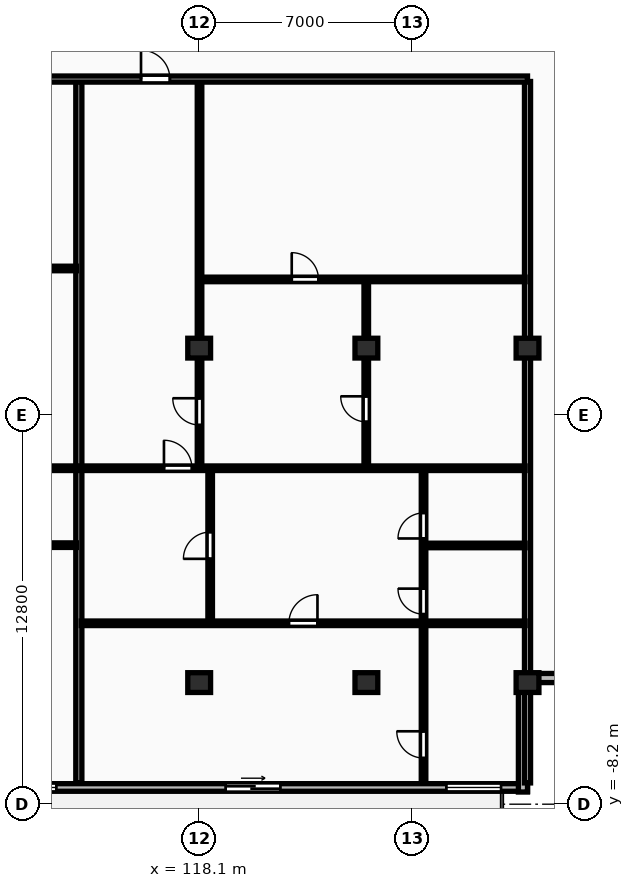
"""IFC4 building model, lengths in metres.
Left out: names, types, materials, properties, quantities, classifications, styles, units other than length and angle.
Written with IfcOpenShell. Run it as: python <this file> out.ifc"""

import sys

from ifc_helpers import new_model, si_unit, direction, frame, frame_2d, origin, origin_2d, place, context, subcontext, project, spatial, rectangle, extrude, element, fill, save


model = new_model("IFC4")
c1 = context("Model", 3, precision=1e-05, world=origin(), true_north=direction((0.0, 1.0)))
c2 = subcontext(c1, "Body", "Model", "MODEL_VIEW")
j1 = project(units=[si_unit("LENGTHUNIT", "METRE"), si_unit("PLANEANGLEUNIT", "RADIAN")], contexts=[c1])
p1 = place(None, origin())
s1 = spatial("IfcSite", under=j1, at=p1, CompositionType="ELEMENT")
p2 = place(p1, origin())
s2 = spatial("IfcBuilding", under=s1, at=p2, CompositionType="ELEMENT")
p3 = place(p2, frame((0.0, 0.0, 201.1)))
s3 = spatial("IfcBuildingStorey", under=s2, at=p3, CompositionType="ELEMENT", Elevation=201.1)
for number, where, z_axis, x_axis in (
    (1, (118.1, -4.2, 0.0), (0.0, 0.0, 1.0), (1.0, 0.0, 0.0)),
    (2, (118.1, 6.8, 0.0), (0.0, 0.0, 1.0), (1.0, 0.0, 0.0)),
    (3, (123.6, -4.2, 0.0), (0.0, 0.0, 1.0), (1.0, 0.0, 0.0)),
    (4, (123.6, 6.8, 0.0), (0.0, 0.0, 1.0), (1.0, 0.0, 0.0)),
    (5, (128.9, -4.2, 0.0), (0.0, 0.0, 1.0), (1.0, 0.0, 0.0)),
    (6, (128.9, 6.8, 0.0), (0.0, 0.0, 1.0), (1.0, 0.0, 0.0)),
):
    element("IfcColumn", number, at=place(p3, frame(where, z_axis=z_axis, x_axis=x_axis)), inside=s3, PredefinedType="COLUMN", context=c2, shape_type="SweptSolid", body=[
        extrude(rectangle(XDim=0.75, YDim=0.65, at=origin_2d()), origin(), (0.0, 0.0, 1.0), 3.25),
    ])
p4 = place(p3, frame((74.5, -7.65, 0.0), z_axis=(0.0, 0.0, 1.0), x_axis=(1.0, 0.0, 0.0)))
e7 = element("IfcWall", 7, at=p4, inside=s3, PredefinedType="STANDARD", context=c2, shape_type="SweptSolid", body=[
    extrude(rectangle(XDim=54.4, YDim=0.25, at=frame_2d((27.2, 0.0))), origin(), (0.0, 0.0, 1.0), 2.97),
])
p5 = place(p4, frame((3.604, 0.0, 0.0)))
e8 = element("IfcOpeningElement", 8, at=p5, cuts=e7, PredefinedType="OPENING", context=c2, shape_type="SweptSolid", body=[
    extrude(rectangle(XDim=1.8, YDim=2.2, at=frame_2d((0.9, 1.1))), frame((0.0, 0.135, 0.0), z_axis=(0.0, -1.0, 0.0), x_axis=(1.0, 0.0, 0.0)), (0.0, 0.0, 1.0), 0.27),
])
p6 = place(p4, frame((13.492, 0.0, 0.85)))
e9 = element("IfcOpeningElement", 9, at=p6, cuts=e7, PredefinedType="OPENING", context=c2, shape_type="SweptSolid", body=[
    extrude(rectangle(XDim=2.4, YDim=1.9, at=frame_2d((1.2, 0.95))), frame((0.0, 0.135, 0.0), z_axis=(0.0, -1.0, 0.0), x_axis=(1.0, 0.0, 0.0)), (0.0, 0.0, 1.0), 0.27),
])
p7 = place(p4, frame((28.655, 0.0, 0.85)))
e10 = element("IfcOpeningElement", 10, at=p7, cuts=e7, PredefinedType="OPENING", context=c2, shape_type="SweptSolid", body=[
    extrude(rectangle(XDim=2.4, YDim=1.9, at=frame_2d((1.2, 0.95))), frame((0.0, 0.135, 0.0), z_axis=(0.0, -1.0, 0.0), x_axis=(1.0, 0.0, 0.0)), (0.0, 0.0, 1.0), 0.27),
])
p8 = place(p4, frame((33.155, 0.0, 0.85)))
e11 = element("IfcOpeningElement", 11, at=p8, cuts=e7, PredefinedType="OPENING", context=c2, shape_type="SweptSolid", body=[
    extrude(rectangle(XDim=2.4, YDim=1.9, at=frame_2d((1.2, 0.95))), frame((0.0, 0.135, 0.0), z_axis=(0.0, -1.0, 0.0), x_axis=(1.0, 0.0, 0.0)), (0.0, 0.0, 1.0), 0.27),
])
p9 = place(p4, frame((23.208, 0.0, 0.0)))
e12 = element("IfcOpeningElement", 12, at=p9, cuts=e7, PredefinedType="OPENING", context=c2, shape_type="SweptSolid", body=[
    extrude(rectangle(XDim=1.8, YDim=2.2, at=frame_2d((0.9, 1.1))), frame((0.0, 0.135, 0.0), z_axis=(0.0, -1.0, 0.0), x_axis=(1.0, 0.0, 0.0)), (0.0, 0.0, 1.0), 0.27),
])
p10 = place(p4, frame((37.101, 0.0, 0.85)))
e13 = element("IfcOpeningElement", 13, at=p10, cuts=e7, PredefinedType="OPENING", context=c2, shape_type="SweptSolid", body=[
    extrude(rectangle(XDim=1.8, YDim=1.8, at=frame_2d((0.9, 0.9))), frame((0.0, 0.135, 0.0), z_axis=(0.0, -1.0, 0.0), x_axis=(1.0, 0.0, 0.0)), (0.0, 0.0, 1.0), 0.27),
])
p11 = place(p4, frame((44.471, 0.0, 0.0)))
e14 = element("IfcOpeningElement", 14, at=p11, cuts=e7, PredefinedType="OPENING", context=c2, shape_type="SweptSolid", body=[
    extrude(rectangle(XDim=1.8, YDim=2.2, at=frame_2d((0.9, 1.1))), frame((0.0, 0.135, 0.0), z_axis=(0.0, -1.0, 0.0), x_axis=(1.0, 0.0, 0.0)), (0.0, 0.0, 1.0), 0.27),
])
p12 = place(p4, frame((51.73, 0.0, 0.85)))
e15 = element("IfcOpeningElement", 15, at=p12, cuts=e7, PredefinedType="OPENING", context=c2, shape_type="SweptSolid", body=[
    extrude(rectangle(XDim=1.8, YDim=1.8, at=frame_2d((0.9, 0.9))), frame((0.0, 0.135, 0.0), z_axis=(0.0, -1.0, 0.0), x_axis=(1.0, 0.0, 0.0)), (0.0, 0.0, 1.0), 0.27),
])
for number, where, z_axis, x_axis in (
    (16, (128.75, -7.8, 0.0), (0.0, 0.0, 1.0), (0.0, 1.0, 0.0)),
    (17, (128.9, -4.05, 0.0), (0.0, 0.0, 1.0), (1.0, 0.0, 0.0)),
):
    element("IfcWall", number, at=place(p3, frame(where, z_axis=z_axis, x_axis=x_axis)), inside=s3, PredefinedType="STANDARD", context=c2, shape_type="SweptSolid", body=[
        extrude(rectangle(XDim=3.6, YDim=0.3, at=frame_2d((1.8, 0.0))), origin(), (0.0, 0.0, 1.0), 2.97),
    ])
p13 = place(p3, frame((128.9, -7.5, 0.0), z_axis=(0.0, 0.0, 1.0), x_axis=(0.0, 1.0, 0.0)))
e18 = element("IfcWall", 18, at=p13, inside=s3, PredefinedType="PARTITIONING", context=c2, shape_type="SweptSolid", body=[
    extrude(rectangle(XDim=23.07, YDim=0.2, at=frame_2d((11.535, 0.0))), origin(), (0.0, 0.0, 1.0), 2.2),
])
p14 = place(p3, frame((114.142, -7.5, 0.0), z_axis=(0.0, 0.0, 1.0), x_axis=(0.0, 1.0, 0.0)))
e19 = element("IfcWall", 19, at=p14, inside=s3, PredefinedType="PARTITIONING", context=c2, shape_type="SweptSolid", body=[
    extrude(rectangle(XDim=23.07, YDim=0.2, at=frame_2d((11.535, 0.0))), origin(), (0.0, 0.0, 1.0), 2.97),
])
p15 = place(p3, frame((99.147, 9.42, 0.0), z_axis=(0.0, 0.0, 1.0), x_axis=(1.0, 0.0, 0.0)))
e20 = element("IfcWall", 20, at=p15, inside=s3, PredefinedType="PARTITIONING", context=c2, shape_type="SweptSolid", body=[
    extrude(rectangle(XDim=14.915, YDim=0.15, at=frame_2d((7.458, 0.0))), origin(), (0.0, 0.0, 1.0), 2.97),
])
p16 = place(p15, frame((6.238, 0.0, 0.0)))
e21 = element("IfcOpeningElement", 21, at=p16, cuts=e20, PredefinedType="OPENING", context=c2, shape_type="SweptSolid", body=[
    extrude(rectangle(XDim=0.88, YDim=2.06, at=frame_2d((0.44, 1.03))), frame((0.0, 0.085, 0.0), z_axis=(0.0, -1.0, 0.0), x_axis=(1.0, 0.0, 0.0)), (0.0, 0.0, 1.0), 0.17),
])
p17 = place(p3, frame((102.02, 0.32, 0.0), z_axis=(0.0, 0.0, 1.0), x_axis=(1.0, 0.0, 0.0)))
e22 = element("IfcWall", 22, at=p17, inside=s3, PredefinedType="PARTITIONING", context=c2, shape_type="SweptSolid", body=[
    extrude(rectangle(XDim=12.042, YDim=0.15, at=frame_2d((6.021, 0.0))), origin(), (0.0, 0.0, 1.0), 2.97),
])
p18 = place(p17, frame((1.034, 0.0, 0.0)))
e23 = element("IfcOpeningElement", 23, at=p18, cuts=e22, PredefinedType="OPENING", context=c2, shape_type="SweptSolid", body=[
    extrude(rectangle(XDim=0.84, YDim=2.04, at=frame_2d((0.42, 1.02))), frame((0.0, 0.085, 0.0), z_axis=(0.0, -1.0, 0.0), x_axis=(1.0, 0.0, 0.0)), (0.0, 0.0, 1.0), 0.17),
])
p19 = place(p17, frame((5.601, 0.0, 0.0)))
e24 = element("IfcOpeningElement", 24, at=p19, cuts=e22, PredefinedType="OPENING", context=c2, shape_type="SweptSolid", body=[
    extrude(rectangle(XDim=0.84, YDim=2.04, at=frame_2d((0.42, 1.02))), frame((0.0, 0.085, 0.0), z_axis=(0.0, -1.0, 0.0), x_axis=(1.0, 0.0, 0.0)), (0.0, 0.0, 1.0), 0.17),
])
p20 = place(p17, frame((9.21, 0.0, 0.0)))
e25 = element("IfcOpeningElement", 25, at=p20, cuts=e22, PredefinedType="OPENING", context=c2, shape_type="SweptSolid", body=[
    extrude(rectangle(XDim=0.84, YDim=2.04, at=frame_2d((0.42, 1.02))), frame((0.0, 0.085, 0.0), z_axis=(0.0, -1.0, 0.0), x_axis=(1.0, 0.0, 0.0)), (0.0, 0.0, 1.0), 0.17),
])
p21 = place(p3, frame((95.197, 2.85, 0.0), z_axis=(0.0, 0.0, 1.0), x_axis=(1.0, 0.0, 0.0)))
e26 = element("IfcWall", 26, at=p21, inside=s3, PredefinedType="PARTITIONING", context=c2, shape_type="SweptSolid", body=[
    extrude(rectangle(XDim=18.865, YDim=0.15, at=frame_2d((9.433, 0.0))), origin(), (0.0, 0.0, 1.0), 2.97),
])
p22 = place(p21, frame((2.72, 0.0, 0.0)))
e27 = element("IfcOpeningElement", 27, at=p22, cuts=e26, PredefinedType="OPENING", context=c2, shape_type="SweptSolid", body=[
    extrude(rectangle(XDim=0.92, YDim=2.08, at=frame_2d((0.46, 1.04))), frame((0.0, 0.085, 0.0), z_axis=(0.0, -1.0, 0.0), x_axis=(1.0, 0.0, 0.0)), (0.0, 0.0, 1.0), 0.17),
])
p23 = place(p3, frame((123.596, 2.89, 0.0), z_axis=(0.0, 0.0, 1.0), x_axis=(0.0, 1.0, 0.0)))
e28 = element("IfcWall", 28, at=p23, inside=s3, PredefinedType="PARTITIONING", context=c2, shape_type="SweptSolid", body=[
    extrude(rectangle(XDim=6.17, YDim=0.15, at=frame_2d((3.085, 0.0))), origin(), (0.0, 0.0, 1.0), 2.2),
])
p24 = place(p23, frame((1.485, 0.0, 0.0)))
e29 = element("IfcOpeningElement", 29, at=p24, cuts=e28, PredefinedType="OPENING", context=c2, shape_type="SweptSolid", body=[
    extrude(rectangle(XDim=0.84, YDim=2.04, at=frame_2d((0.42, 1.02))), frame((0.0, 0.085, 0.0), z_axis=(0.0, -1.0, 0.0), x_axis=(1.0, 0.0, 0.0)), (0.0, 0.0, 1.0), 0.17),
])
p25 = place(p3, frame((118.172, 9.06, 0.0), z_axis=(0.0, 0.0, 1.0), x_axis=(1.0, 0.0, 0.0)))
e30 = element("IfcWall", 30, at=p25, inside=s3, PredefinedType="PARTITIONING", context=c2, shape_type="SweptSolid", body=[
    extrude(rectangle(XDim=10.648, YDim=0.15, at=frame_2d((5.324, 0.0))), origin(), (0.0, 0.0, 1.0), 2.97),
])
p26 = place(p25, frame((2.973, 0.0, 0.0)))
e31 = element("IfcOpeningElement", 31, at=p26, cuts=e30, PredefinedType="OPENING", context=c2, shape_type="SweptSolid", body=[
    extrude(rectangle(XDim=0.88, YDim=2.06, at=frame_2d((0.44, 1.03))), frame((0.0, 0.085, 0.0), z_axis=(0.0, -1.0, 0.0), x_axis=(1.0, 0.0, 0.0)), (0.0, 0.0, 1.0), 0.17),
])
p27 = place(p3, frame((118.112, 2.89, 0.0), z_axis=(0.0, 0.0, 1.0), x_axis=(0.0, 1.0, 0.0)))
e32 = element("IfcWall", 32, at=p27, inside=s3, PredefinedType="PARTITIONING", context=c2, shape_type="SweptSolid", body=[
    extrude(rectangle(XDim=12.7, YDim=0.15, at=frame_2d((6.35, 0.0))), origin(), (0.0, 0.0, 1.0), 2.2),
])
p28 = place(p27, frame((1.382, 0.0, 0.0)))
e33 = element("IfcOpeningElement", 33, at=p28, cuts=e32, PredefinedType="OPENING", context=c2, shape_type="SweptSolid", body=[
    extrude(rectangle(XDim=0.88, YDim=2.06, at=frame_2d((0.44, 1.03))), frame((0.0, 0.085, 0.0), z_axis=(0.0, -1.0, 0.0), x_axis=(1.0, 0.0, 0.0)), (0.0, 0.0, 1.0), 0.17),
])
p29 = place(p3, frame((118.462, -2.19, 0.0), z_axis=(0.0, 0.0, 1.0), x_axis=(0.0, 1.0, 0.0)))
e34 = element("IfcWall", 34, at=p29, inside=s3, PredefinedType="PARTITIONING", context=c2, shape_type="SweptSolid", body=[
    extrude(rectangle(XDim=5.0, YDim=0.15, at=frame_2d((2.5, 0.0))), origin(), (0.0, 0.0, 1.0), 2.97),
])
p30 = place(p29, frame((2.06, 0.0, 0.0)))
e35 = element("IfcOpeningElement", 35, at=p30, cuts=e34, PredefinedType="OPENING", context=c2, shape_type="SweptSolid", body=[
    extrude(rectangle(XDim=0.88, YDim=2.06, at=frame_2d((0.44, 1.03))), frame((0.0, 0.085, 0.0), z_axis=(0.0, -1.0, 0.0), x_axis=(1.0, 0.0, 0.0)), (0.0, 0.0, 1.0), 0.17),
])
p31 = place(p3, frame((125.54, 0.31, 0.0), z_axis=(0.0, 0.0, 1.0), x_axis=(1.0, 0.0, 0.0)))
e36 = element("IfcWall", 36, at=p31, inside=s3, PredefinedType="PARTITIONING", context=c2, shape_type="SweptSolid", body=[
    extrude(rectangle(XDim=3.28, YDim=0.15, at=frame_2d((1.64, 0.0))), origin(), (0.0, 0.0, 1.0), 2.97),
])
p32 = place(p3, frame((125.48, -7.5, 0.0), z_axis=(0.0, 0.0, 1.0), x_axis=(0.0, 1.0, 0.0)))
e37 = element("IfcWall", 37, at=p32, inside=s3, PredefinedType="PARTITIONING", context=c2, shape_type="SweptSolid", body=[
    extrude(rectangle(XDim=10.31, YDim=0.15, at=frame_2d((5.155, 0.0))), origin(), (0.0, 0.0, 1.0), 2.97),
])
p33 = place(p32, frame((5.55, 0.0, 0.0)))
e38 = element("IfcOpeningElement", 38, at=p33, cuts=e37, PredefinedType="OPENING", context=c2, shape_type="SweptSolid", body=[
    extrude(rectangle(XDim=0.84, YDim=2.04, at=frame_2d((0.42, 1.02))), frame((0.0, 0.085, 0.0), z_axis=(0.0, -1.0, 0.0), x_axis=(1.0, 0.0, 0.0)), (0.0, 0.0, 1.0), 0.17),
])
p34 = place(p32, frame((8.04, 0.0, 0.0)))
e39 = element("IfcOpeningElement", 39, at=p34, cuts=e37, PredefinedType="OPENING", context=c2, shape_type="SweptSolid", body=[
    extrude(rectangle(XDim=0.84, YDim=2.04, at=frame_2d((0.42, 1.02))), frame((0.0, 0.085, 0.0), z_axis=(0.0, -1.0, 0.0), x_axis=(1.0, 0.0, 0.0)), (0.0, 0.0, 1.0), 0.17),
])
p35 = place(p32, frame((0.818, 0.0, 0.0)))
e40 = element("IfcOpeningElement", 40, at=p35, cuts=e37, PredefinedType="OPENING", context=c2, shape_type="SweptSolid", body=[
    extrude(rectangle(XDim=0.88, YDim=2.06, at=frame_2d((0.44, 1.03))), frame((0.0, 0.085, 0.0), z_axis=(0.0, -1.0, 0.0), x_axis=(1.0, 0.0, 0.0)), (0.0, 0.0, 1.0), 0.17),
])
p36 = place(p3, frame((114.222, 2.85, 0.0), z_axis=(0.0, 0.0, 1.0), x_axis=(1.0, 0.0, 0.0)))
e41 = element("IfcWall", 41, at=p36, inside=s3, PredefinedType="PARTITIONING", context=c2, shape_type="SweptSolid", body=[
    extrude(rectangle(XDim=14.598, YDim=0.15, at=frame_2d((7.299, 0.0))), origin(), (0.0, 0.0, 1.0), 2.97),
])
p37 = place(p36, frame((2.72, 0.0, 0.0)))
e42 = element("IfcOpeningElement", 42, at=p37, cuts=e41, PredefinedType="OPENING", context=c2, shape_type="SweptSolid", body=[
    extrude(rectangle(XDim=0.92, YDim=2.08, at=frame_2d((0.46, 1.04))), frame((0.0, 0.085, 0.0), z_axis=(0.0, -1.0, 0.0), x_axis=(1.0, 0.0, 0.0)), (0.0, 0.0, 1.0), 0.17),
])
p38 = place(p3, frame((114.222, -2.25, 0.0), z_axis=(0.0, 0.0, 1.0), x_axis=(1.0, 0.0, 0.0)))
e43 = element("IfcWall", 43, at=p38, inside=s3, PredefinedType="PARTITIONING", context=c2, shape_type="SweptSolid", body=[
    extrude(rectangle(XDim=14.598, YDim=0.15, at=frame_2d((7.299, 0.0))), origin(), (0.0, 0.0, 1.0), 2.97),
])
p39 = place(p38, frame((6.829, 0.0, 0.0)))
e44 = element("IfcOpeningElement", 44, at=p39, cuts=e43, PredefinedType="OPENING", context=c2, shape_type="SweptSolid", body=[
    extrude(rectangle(XDim=0.94, YDim=2.1, at=frame_2d((0.47, 1.05))), frame((0.0, 0.085, 0.0), z_axis=(0.0, -1.0, 0.0), x_axis=(1.0, 0.0, 0.0)), (0.0, 0.0, 1.0), 0.17),
])
p40 = place(p3, frame((74.5, 15.65, 0.0), z_axis=(0.0, 0.0, 1.0), x_axis=(1.0, 0.0, 0.0)))
e45 = element("IfcWall", 45, at=p40, inside=s3, PredefinedType="PARTITIONING", context=c2, shape_type="SweptSolid", body=[
    extrude(rectangle(XDim=54.4, YDim=0.2, at=frame_2d((27.2, 0.0))), origin(), (0.0, 0.0, 1.0), 2.97),
])
p41 = place(p40, frame((8.618, 0.0, 0.0)))
e46 = element("IfcOpeningElement", 46, at=p41, cuts=e45, PredefinedType="OPENING", context=c2, shape_type="SweptSolid", body=[
    extrude(rectangle(XDim=1.22, YDim=2.18, at=frame_2d((0.61, 1.09))), frame((0.0, 0.11, 0.0), z_axis=(0.0, -1.0, 0.0), x_axis=(1.0, 0.0, 0.0)), (0.0, 0.0, 1.0), 0.22),
])
p42 = place(p40, frame((22.662, 0.0, 0.0)))
e47 = element("IfcOpeningElement", 47, at=p42, cuts=e45, PredefinedType="OPENING", context=c2, shape_type="SweptSolid", body=[
    extrude(rectangle(XDim=0.95, YDim=2.15, at=frame_2d((0.475, 1.075))), frame((0.0, 0.11, 0.0), z_axis=(0.0, -1.0, 0.0), x_axis=(1.0, 0.0, 0.0)), (0.0, 0.0, 1.0), 0.22),
])
p43 = place(p40, frame((41.687, 0.0, 0.0)))
e48 = element("IfcOpeningElement", 48, at=p43, cuts=e45, PredefinedType="OPENING", context=c2, shape_type="SweptSolid", body=[
    extrude(rectangle(XDim=0.95, YDim=2.15, at=frame_2d((0.475, 1.075))), frame((0.0, 0.11, 0.0), z_axis=(0.0, -1.0, 0.0), x_axis=(1.0, 0.0, 0.0)), (0.0, 0.0, 1.0), 0.22),
])
p44 = place(p10, origin())
e49 = element("IfcWindow", 49, at=p44, inside=s3, PartitioningType="SINGLE_PANEL", PredefinedType="WINDOW", context=c2, shape_type="SweptSolid", body=[
    extrude(rectangle(XDim=1.8, YDim=1.8, at=frame_2d((0.9, 0.9))), frame((0.0, 0.03, 0.0), z_axis=(0.0, -1.0, 0.0), x_axis=(1.0, 0.0, 0.0)), (0.0, 0.0, 1.0), 0.06),
])
fill(e13, e49)
p45 = place(p11, origin())
e50 = element("IfcDoor", 50, at=p45, inside=s3, OperationType="SLIDING_TO_RIGHT", PredefinedType="DOOR", context=c2, shape_type="SweptSolid", body=[
    extrude(rectangle(XDim=1.8, YDim=2.2, at=frame_2d((0.9, 1.1))), frame((0.0, 0.025, 0.0), z_axis=(0.0, -1.0, 0.0), x_axis=(1.0, 0.0, 0.0)), (0.0, 0.0, 1.0), 0.05),
])
fill(e14, e50)
p46 = place(p12, origin())
e51 = element("IfcWindow", 51, at=p46, inside=s3, PartitioningType="SINGLE_PANEL", PredefinedType="WINDOW", context=c2, shape_type="SweptSolid", body=[
    extrude(rectangle(XDim=1.8, YDim=1.8, at=frame_2d((0.9, 0.9))), frame((0.0, 0.03, 0.0), z_axis=(0.0, -1.0, 0.0), x_axis=(1.0, 0.0, 0.0)), (0.0, 0.0, 1.0), 0.06),
])
fill(e15, e51)
p47 = place(p24, origin())
e52 = element("IfcDoor", 52, at=p47, inside=s3, OperationType="SINGLE_SWING_RIGHT", PredefinedType="DOOR", context=c2, shape_type="SweptSolid", body=[
    extrude(rectangle(XDim=0.84, YDim=2.04, at=frame_2d((0.42, 1.02))), frame((0.0, 0.025, 0.0), z_axis=(0.0, -1.0, 0.0), x_axis=(1.0, 0.0, 0.0)), (0.0, 0.0, 1.0), 0.05),
])
fill(e29, e52)
p48 = place(p26, origin())
e53 = element("IfcDoor", 53, at=p48, inside=s3, OperationType="SINGLE_SWING_LEFT", PredefinedType="DOOR", context=c2, shape_type="SweptSolid", body=[
    extrude(rectangle(XDim=0.88, YDim=2.06, at=frame_2d((0.44, 1.03))), frame((0.0, 0.025, 0.0), z_axis=(0.0, -1.0, 0.0), x_axis=(1.0, 0.0, 0.0)), (0.0, 0.0, 1.0), 0.05),
])
fill(e31, e53)
p49 = place(p28, origin())
e54 = element("IfcDoor", 54, at=p49, inside=s3, OperationType="SINGLE_SWING_RIGHT", PredefinedType="DOOR", context=c2, shape_type="SweptSolid", body=[
    extrude(rectangle(XDim=0.88, YDim=2.06, at=frame_2d((0.44, 1.03))), frame((0.0, 0.025, 0.0), z_axis=(0.0, -1.0, 0.0), x_axis=(1.0, 0.0, 0.0)), (0.0, 0.0, 1.0), 0.05),
])
fill(e33, e54)
p50 = place(p30, origin())
e55 = element("IfcDoor", 55, at=p50, inside=s3, OperationType="SINGLE_SWING_LEFT", PredefinedType="DOOR", context=c2, shape_type="SweptSolid", body=[
    extrude(rectangle(XDim=0.88, YDim=2.06, at=frame_2d((0.44, 1.03))), frame((0.0, 0.025, 0.0), z_axis=(0.0, -1.0, 0.0), x_axis=(1.0, 0.0, 0.0)), (0.0, 0.0, 1.0), 0.05),
])
fill(e35, e55)
p51 = place(p33, origin())
e56 = element("IfcDoor", 56, at=p51, inside=s3, OperationType="SINGLE_SWING_RIGHT", PredefinedType="DOOR", context=c2, shape_type="SweptSolid", body=[
    extrude(rectangle(XDim=0.84, YDim=2.04, at=frame_2d((0.42, 1.02))), frame((0.0, 0.025, 0.0), z_axis=(0.0, -1.0, 0.0), x_axis=(1.0, 0.0, 0.0)), (0.0, 0.0, 1.0), 0.05),
])
fill(e38, e56)
p52 = place(p34, origin())
e57 = element("IfcDoor", 57, at=p52, inside=s3, OperationType="SINGLE_SWING_LEFT", PredefinedType="DOOR", context=c2, shape_type="SweptSolid", body=[
    extrude(rectangle(XDim=0.84, YDim=2.04, at=frame_2d((0.42, 1.02))), frame((0.0, 0.025, 0.0), z_axis=(0.0, -1.0, 0.0), x_axis=(1.0, 0.0, 0.0)), (0.0, 0.0, 1.0), 0.05),
])
fill(e39, e57)
p53 = place(p35, origin())
e58 = element("IfcDoor", 58, at=p53, inside=s3, OperationType="SINGLE_SWING_RIGHT", PredefinedType="DOOR", context=c2, shape_type="SweptSolid", body=[
    extrude(rectangle(XDim=0.88, YDim=2.06, at=frame_2d((0.44, 1.03))), frame((0.0, 0.025, 0.0), z_axis=(0.0, -1.0, 0.0), x_axis=(1.0, 0.0, 0.0)), (0.0, 0.0, 1.0), 0.05),
])
fill(e40, e58)
p54 = place(p37, origin())
e59 = element("IfcDoor", 59, at=p54, inside=s3, OperationType="SINGLE_SWING_LEFT", PredefinedType="DOOR", context=c2, shape_type="SweptSolid", body=[
    extrude(rectangle(XDim=0.92, YDim=2.08, at=frame_2d((0.46, 1.04))), frame((0.0, 0.025, 0.0), z_axis=(0.0, -1.0, 0.0), x_axis=(1.0, 0.0, 0.0)), (0.0, 0.0, 1.0), 0.05),
])
fill(e42, e59)
p55 = place(p39, origin())
e60 = element("IfcDoor", 60, at=p55, inside=s3, OperationType="SINGLE_SWING_RIGHT", PredefinedType="DOOR", context=c2, shape_type="SweptSolid", body=[
    extrude(rectangle(XDim=0.94, YDim=2.1, at=frame_2d((0.47, 1.05))), frame((0.0, 0.025, 0.0), z_axis=(0.0, -1.0, 0.0), x_axis=(1.0, 0.0, 0.0)), (0.0, 0.0, 1.0), 0.05),
])
fill(e44, e60)
p56 = place(p43, origin())
e61 = element("IfcDoor", 61, at=p56, inside=s3, OperationType="SINGLE_SWING_LEFT", PredefinedType="DOOR", context=c2, shape_type="SweptSolid", body=[
    extrude(rectangle(XDim=0.95, YDim=2.15, at=frame_2d((0.475, 1.075))), frame((0.0, 0.025, 0.0), z_axis=(0.0, -1.0, 0.0), x_axis=(1.0, 0.0, 0.0)), (0.0, 0.0, 1.0), 0.05),
])
fill(e48, e61)
save(model, sys.argv[1])
